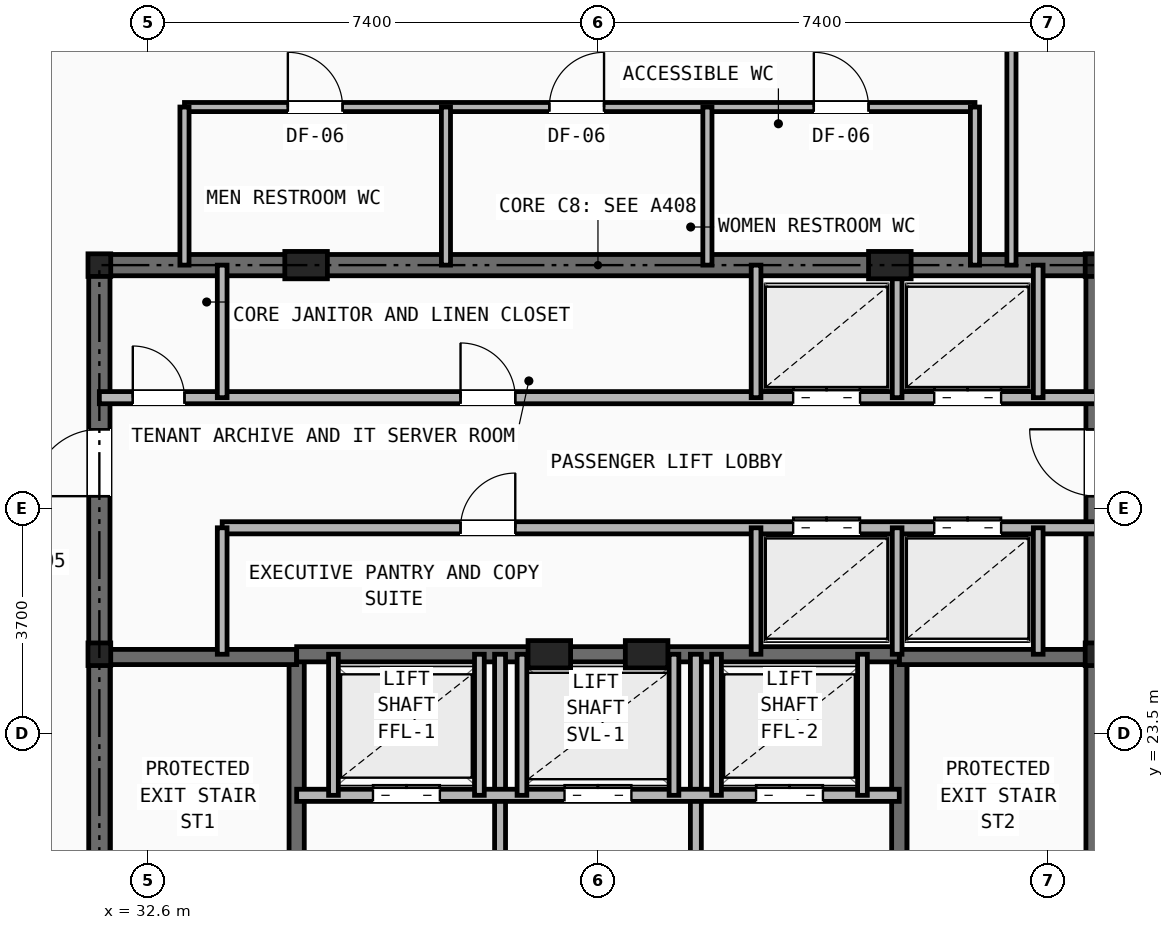
"""IFC4 building model, lengths in metres.
Left out: names, types, materials, properties, quantities, classifications, styles, units other than length and angle.
Written with IfcOpenShell. Run it as: python <this file> out.ifc"""

import sys

from ifc_helpers import new_model, si_unit, direction, frame, frame_2d, origin, origin_2d, place, context, subcontext, project, spatial, rectangle, i_section, extrude, element, fill, save


model = new_model("IFC4")
c1 = context("Model", 3, precision=1e-05, world=origin(), true_north=direction((0.0, 1.0)))
c2 = subcontext(c1, "Body", "Model", "MODEL_VIEW")
j1 = project(units=[si_unit("LENGTHUNIT", "METRE"), si_unit("PLANEANGLEUNIT", "RADIAN")], contexts=[c1])
p1 = place(None, origin())
s1 = spatial("IfcSite", under=j1, at=p1, CompositionType="ELEMENT")
p2 = place(p1, origin())
s2 = spatial("IfcBuilding", under=s1, at=p2, CompositionType="ELEMENT")
p3 = place(p2, frame((0.0, 0.0, 276.0)))
s3 = spatial("IfcBuildingStorey", under=s2, at=p3, CompositionType="ELEMENT", Elevation=276.0)
for number, where, z_axis, x_axis in (
    (1, (31.8, 24.8, 0.0), (0.0, 0.0, 1.0), (1.0, 0.0, 0.0)),
    (2, (48.2, 24.8, 0.0), (0.0, 0.0, 1.0), (1.0, 0.0, 0.0)),
    (3, (31.8, 31.2, 0.0), (0.0, 0.0, 1.0), (1.0, 0.0, 0.0)),
    (4, (48.2, 31.2, 0.0), (0.0, 0.0, 1.0), (1.0, 0.0, 0.0)),
):
    element("IfcColumn", number, at=place(p3, frame(where, z_axis=z_axis, x_axis=x_axis)), inside=s3, PredefinedType="COLUMN", context=c2, shape_type="SweptSolid", body=[
        extrude(i_section(OverallWidth=0.374, OverallDepth=0.372, WebThickness=0.016, FlangeThickness=0.026, at=origin_2d()), origin(), (0.0, 0.0, 1.0), 3.5),
    ])
for number, where, z_axis, x_axis in (
    (5, (35.2, 31.2, 0.0), (0.0, 0.0, 1.0), (1.0, 0.0, 0.0)),
    (6, (44.8, 31.2, 0.0), (0.0, 0.0, 1.0), (1.0, 0.0, 0.0)),
    (7, (39.2, 24.8, 0.0), (0.0, 0.0, 1.0), (1.0, 0.0, 0.0)),
    (8, (40.8, 24.8, 0.0), (0.0, 0.0, 1.0), (1.0, 0.0, 0.0)),
):
    element("IfcColumn", number, at=place(p3, frame(where, z_axis=z_axis, x_axis=x_axis)), inside=s3, PredefinedType="PILASTER", context=c2, shape_type="SweptSolid", body=[
        extrude(rectangle(XDim=0.7, YDim=0.45, at=origin_2d()), origin(), (0.0, 0.0, 1.0), 3.5),
    ])
p4 = place(p3, frame((31.8, 31.2, 0.0), z_axis=(0.0, 0.0, 1.0), x_axis=(1.0, 0.0, 0.0)))
e9 = element("IfcWall", 9, at=p4, inside=s3, PredefinedType="SHEAR", context=c2, shape_type="SweptSolid", body=[
    extrude(rectangle(XDim=16.4, YDim=0.35, at=frame_2d((8.2, 0.0))), origin(), (0.0, 0.0, 1.0), 3.25),
])
p5 = place(p3, frame((31.8, 16.4, 0.0), z_axis=(0.0, 0.0, 1.0), x_axis=(0.0, 1.0, 0.0)))
e10 = element("IfcWall", 10, at=p5, inside=s3, PredefinedType="SHEAR", context=c2, shape_type="SweptSolid", body=[
    extrude(rectangle(XDim=14.8, YDim=0.35, at=frame_2d((7.4, 0.0))), origin(), (0.0, 0.0, 1.0), 3.25),
])
p6 = place(p5, frame((11.0, 0.0, 0.0)))
e11 = element("IfcOpeningElement", 11, at=p6, cuts=e10, PredefinedType="OPENING", context=c2, shape_type="SweptSolid", body=[
    extrude(rectangle(XDim=1.1, YDim=2.15, at=frame_2d((0.55, 1.075))), frame((0.0, 0.185, 0.0), z_axis=(0.0, -1.0, 0.0), x_axis=(1.0, 0.0, 0.0)), (0.0, 0.0, 1.0), 0.37),
])
p7 = place(p3, frame((48.2, 16.4, 0.0), z_axis=(0.0, 0.0, 1.0), x_axis=(0.0, 1.0, 0.0)))
e12 = element("IfcWall", 12, at=p7, inside=s3, PredefinedType="SHEAR", context=c2, shape_type="SweptSolid", body=[
    extrude(rectangle(XDim=14.8, YDim=0.35, at=frame_2d((7.4, 0.0))), origin(), (0.0, 0.0, 1.0), 3.25),
])
p8 = place(p7, frame((11.0, 0.0, 0.0)))
e13 = element("IfcOpeningElement", 13, at=p8, cuts=e12, PredefinedType="OPENING", context=c2, shape_type="SweptSolid", body=[
    extrude(rectangle(XDim=1.1, YDim=2.15, at=frame_2d((0.55, 1.075))), frame((0.0, 0.185, 0.0), z_axis=(0.0, -1.0, 0.0), x_axis=(1.0, 0.0, 0.0)), (0.0, 0.0, 1.0), 0.37),
])
p9 = place(p3, frame((35.045, 16.4, 0.0), z_axis=(0.0, 0.0, 1.0), x_axis=(0.0, 1.0, 0.0)))
e14 = element("IfcWall", 14, at=p9, inside=s3, PredefinedType="SHEAR", context=c2, shape_type="SweptSolid", body=[
    extrude(rectangle(XDim=8.4, YDim=0.25, at=frame_2d((4.2, 0.0))), origin(), (0.0, 0.0, 1.0), 3.25),
])
p10 = place(p9, frame((0.45, 0.0, 0.0)))
e15 = element("IfcOpeningElement", 15, at=p10, cuts=e14, PredefinedType="OPENING", context=c2, shape_type="SweptSolid", body=[
    extrude(rectangle(XDim=0.95, YDim=2.1, at=frame_2d((0.475, 1.05))), frame((0.0, 0.135, 0.0), z_axis=(0.0, -1.0, 0.0), x_axis=(1.0, 0.0, 0.0)), (0.0, 0.0, 1.0), 0.27),
])
p11 = place(p3, frame((31.8, 24.755, 0.0), z_axis=(0.0, 0.0, 1.0), x_axis=(1.0, 0.0, 0.0)))
e16 = element("IfcWall", 16, at=p11, inside=s3, PredefinedType="SHEAR", context=c2, shape_type="SweptSolid", body=[
    extrude(rectangle(XDim=3.245, YDim=0.25, at=frame_2d((1.623, 0.0))), origin(), (0.0, 0.0, 1.0), 3.25),
])
p12 = place(p3, frame((44.955, 16.4, 0.0), z_axis=(0.0, 0.0, 1.0), x_axis=(0.0, 1.0, 0.0)))
e17 = element("IfcWall", 17, at=p12, inside=s3, PredefinedType="SHEAR", context=c2, shape_type="SweptSolid", body=[
    extrude(rectangle(XDim=8.4, YDim=0.25, at=frame_2d((4.2, 0.0))), origin(), (0.0, 0.0, 1.0), 3.25),
])
p13 = place(p12, frame((0.45, 0.0, 0.0)))
e18 = element("IfcOpeningElement", 18, at=p13, cuts=e17, PredefinedType="OPENING", context=c2, shape_type="SweptSolid", body=[
    extrude(rectangle(XDim=0.95, YDim=2.1, at=frame_2d((0.475, 1.05))), frame((0.0, 0.135, 0.0), z_axis=(0.0, -1.0, 0.0), x_axis=(1.0, 0.0, 0.0)), (0.0, 0.0, 1.0), 0.27),
])
p14 = place(p3, frame((44.955, 24.755, 0.0), z_axis=(0.0, 0.0, 1.0), x_axis=(1.0, 0.0, 0.0)))
e19 = element("IfcWall", 19, at=p14, inside=s3, PredefinedType="SHEAR", context=c2, shape_type="SweptSolid", body=[
    extrude(rectangle(XDim=3.245, YDim=0.25, at=frame_2d((1.623, 0.0))), origin(), (0.0, 0.0, 1.0), 3.25),
])
p15 = place(p3, frame((35.045, 24.8, 0.0), z_axis=(0.0, 0.0, 1.0), x_axis=(1.0, 0.0, 0.0)))
e20 = element("IfcWall", 20, at=p15, inside=s3, PredefinedType="SHEAR", context=c2, shape_type="SweptSolid", body=[
    extrude(rectangle(XDim=9.91, YDim=0.25, at=frame_2d((4.955, 0.0))), origin(), (0.0, 0.0, 1.0), 3.25),
])
p16 = place(p3, frame((38.39, 16.4, 0.0), z_axis=(0.0, 0.0, 1.0), x_axis=(0.0, 1.0, 0.0)))
e21 = element("IfcWall", 21, at=p16, inside=s3, PredefinedType="PARTITIONING", context=c2, shape_type="SweptSolid", body=[
    extrude(rectangle(XDim=8.4, YDim=0.18, at=frame_2d((4.2, 0.0))), origin(), (0.0, 0.0, 1.0), 2.705),
])
p17 = place(p16, frame((3.8, 0.0, 0.0)))
e22 = element("IfcOpeningElement", 22, at=p17, cuts=e21, PredefinedType="OPENING", context=c2, shape_type="SweptSolid", body=[
    extrude(rectangle(XDim=0.95, YDim=2.1, at=frame_2d((0.475, 1.05))), frame((0.0, 0.1, 0.0), z_axis=(0.0, -1.0, 0.0), x_axis=(1.0, 0.0, 0.0)), (0.0, 0.0, 1.0), 0.2),
])
p18 = place(p3, frame((41.61, 16.4, 0.0), z_axis=(0.0, 0.0, 1.0), x_axis=(0.0, 1.0, 0.0)))
e23 = element("IfcWall", 23, at=p18, inside=s3, PredefinedType="PARTITIONING", context=c2, shape_type="SweptSolid", body=[
    extrude(rectangle(XDim=8.4, YDim=0.18, at=frame_2d((4.2, 0.0))), origin(), (0.0, 0.0, 1.0), 2.705),
])
p19 = place(p3, frame((35.045, 22.48, 0.0), z_axis=(0.0, 0.0, 1.0), x_axis=(1.0, 0.0, 0.0)))
e24 = element("IfcWall", 24, at=p19, inside=s3, PredefinedType="SOLIDWALL", context=c2, shape_type="SweptSolid", body=[
    extrude(rectangle(XDim=9.91, YDim=0.2, at=frame_2d((4.955, 0.0))), origin(), (0.0, 0.0, 1.0), 3.25),
])
p20 = place(p19, frame((1.255, 0.0, 0.0)))
e25 = element("IfcOpeningElement", 25, at=p20, cuts=e24, PredefinedType="OPENING", context=c2, shape_type="SweptSolid", body=[
    extrude(rectangle(XDim=1.1, YDim=2.15, at=frame_2d((0.55, 1.075))), frame((0.0, 0.11, 0.0), z_axis=(0.0, -1.0, 0.0), x_axis=(1.0, 0.0, 0.0)), (0.0, 0.0, 1.0), 0.22),
])
p21 = place(p19, frame((7.555, 0.0, 0.0)))
e26 = element("IfcOpeningElement", 26, at=p21, cuts=e24, PredefinedType="OPENING", context=c2, shape_type="SweptSolid", body=[
    extrude(rectangle(XDim=1.1, YDim=2.15, at=frame_2d((0.55, 1.075))), frame((0.0, 0.11, 0.0), z_axis=(0.0, -1.0, 0.0), x_axis=(1.0, 0.0, 0.0)), (0.0, 0.0, 1.0), 0.22),
])
p22 = place(p19, frame((4.405, 0.0, 0.0)))
e27 = element("IfcOpeningElement", 27, at=p22, cuts=e24, PredefinedType="OPENING", context=c2, shape_type="SweptSolid", body=[
    extrude(rectangle(XDim=1.1, YDim=2.15, at=frame_2d((0.55, 1.075))), frame((0.0, 0.11, 0.0), z_axis=(0.0, -1.0, 0.0), x_axis=(1.0, 0.0, 0.0)), (0.0, 0.0, 1.0), 0.22),
])
for number, where, z_axis, x_axis in (
    (28, (35.65, 22.48, 0.0), (0.0, 0.0, 1.0), (0.0, 1.0, 0.0)),
    (29, (38.05, 22.48, 0.0), (0.0, 0.0, 1.0), (0.0, 1.0, 0.0)),
    (30, (41.95, 22.48, 0.0), (0.0, 0.0, 1.0), (0.0, 1.0, 0.0)),
    (31, (44.35, 22.48, 0.0), (0.0, 0.0, 1.0), (0.0, 1.0, 0.0)),
    (32, (38.75, 22.48, 0.0), (0.0, 0.0, 1.0), (0.0, 1.0, 0.0)),
    (33, (41.25, 22.48, 0.0), (0.0, 0.0, 1.0), (0.0, 1.0, 0.0)),
):
    element("IfcWall", number, at=place(p3, frame(where, z_axis=z_axis, x_axis=x_axis)), inside=s3, PredefinedType="SOLIDWALL", context=c2, shape_type="SweptSolid", body=[
        extrude(rectangle(XDim=2.32, YDim=0.16, at=frame_2d((1.16, 0.0))), origin(), (0.0, 0.0, 1.0), 3.25),
    ])
p23 = place(p3, frame((31.8, 29.02, 0.0), z_axis=(0.0, 0.0, 1.0), x_axis=(1.0, 0.0, 0.0)))
e34 = element("IfcWall", 34, at=p23, inside=s3, PredefinedType="SOLIDWALL", context=c2, shape_type="SweptSolid", body=[
    extrude(rectangle(XDim=16.4, YDim=0.2, at=frame_2d((8.2, 0.0))), origin(), (0.0, 0.0, 1.0), 2.705),
])
p24 = place(p23, frame((0.55, 0.0, 0.0)))
e35 = element("IfcOpeningElement", 35, at=p24, cuts=e34, PredefinedType="OPENING", context=c2, shape_type="SweptSolid", body=[
    extrude(rectangle(XDim=0.85, YDim=2.05, at=frame_2d((0.425, 1.025))), frame((0.0, 0.11, 0.0), z_axis=(0.0, -1.0, 0.0), x_axis=(1.0, 0.0, 0.0)), (0.0, 0.0, 1.0), 0.22),
])
p25 = place(p23, frame((5.94, 0.0, 0.0)))
e36 = element("IfcOpeningElement", 36, at=p25, cuts=e34, PredefinedType="OPENING", context=c2, shape_type="SweptSolid", body=[
    extrude(rectangle(XDim=0.9, YDim=2.1, at=frame_2d((0.45, 1.05))), frame((0.0, 0.11, 0.0), z_axis=(0.0, -1.0, 0.0), x_axis=(1.0, 0.0, 0.0)), (0.0, 0.0, 1.0), 0.22),
])
p26 = place(p23, frame((11.41, 0.0, 0.0)))
e37 = element("IfcOpeningElement", 37, at=p26, cuts=e34, PredefinedType="OPENING", context=c2, shape_type="SweptSolid", body=[
    extrude(rectangle(XDim=1.1, YDim=2.15, at=frame_2d((0.55, 1.075))), frame((0.0, 0.11, 0.0), z_axis=(0.0, -1.0, 0.0), x_axis=(1.0, 0.0, 0.0)), (0.0, 0.0, 1.0), 0.22),
])
p27 = place(p23, frame((13.73, 0.0, 0.0)))
e38 = element("IfcOpeningElement", 38, at=p27, cuts=e34, PredefinedType="OPENING", context=c2, shape_type="SweptSolid", body=[
    extrude(rectangle(XDim=1.1, YDim=2.15, at=frame_2d((0.55, 1.075))), frame((0.0, 0.11, 0.0), z_axis=(0.0, -1.0, 0.0), x_axis=(1.0, 0.0, 0.0)), (0.0, 0.0, 1.0), 0.22),
])
p28 = place(p3, frame((33.82, 26.88, 0.0), z_axis=(0.0, 0.0, 1.0), x_axis=(1.0, 0.0, 0.0)))
e39 = element("IfcWall", 39, at=p28, inside=s3, PredefinedType="SOLIDWALL", context=c2, shape_type="SweptSolid", body=[
    extrude(rectangle(XDim=14.38, YDim=0.2, at=frame_2d((7.19, 0.0))), origin(), (0.0, 0.0, 1.0), 2.705),
])
p29 = place(p28, frame((3.92, 0.0, 0.0)))
e40 = element("IfcOpeningElement", 40, at=p29, cuts=e39, PredefinedType="OPENING", context=c2, shape_type="SweptSolid", body=[
    extrude(rectangle(XDim=0.9, YDim=2.1, at=frame_2d((0.45, 1.05))), frame((0.0, 0.11, 0.0), z_axis=(0.0, -1.0, 0.0), x_axis=(1.0, 0.0, 0.0)), (0.0, 0.0, 1.0), 0.22),
])
p30 = place(p28, frame((9.39, 0.0, 0.0)))
e41 = element("IfcOpeningElement", 41, at=p30, cuts=e39, PredefinedType="OPENING", context=c2, shape_type="SweptSolid", body=[
    extrude(rectangle(XDim=1.1, YDim=2.15, at=frame_2d((0.55, 1.075))), frame((0.0, 0.11, 0.0), z_axis=(0.0, -1.0, 0.0), x_axis=(1.0, 0.0, 0.0)), (0.0, 0.0, 1.0), 0.22),
])
p31 = place(p28, frame((11.71, 0.0, 0.0)))
e42 = element("IfcOpeningElement", 42, at=p31, cuts=e39, PredefinedType="OPENING", context=c2, shape_type="SweptSolid", body=[
    extrude(rectangle(XDim=1.1, YDim=2.15, at=frame_2d((0.55, 1.075))), frame((0.0, 0.11, 0.0), z_axis=(0.0, -1.0, 0.0), x_axis=(1.0, 0.0, 0.0)), (0.0, 0.0, 1.0), 0.22),
])
p32 = place(p3, frame((33.82, 29.02, 0.0), z_axis=(0.0, 0.0, 1.0), x_axis=(0.0, 1.0, 0.0)))
e43 = element("IfcWall", 43, at=p32, inside=s3, PredefinedType="SOLIDWALL", context=c2, shape_type="SweptSolid", body=[
    extrude(rectangle(XDim=2.18, YDim=0.16, at=frame_2d((1.09, 0.0))), origin(), (0.0, 0.0, 1.0), 2.705),
])
p33 = place(p3, frame((33.82, 24.8, 0.0), z_axis=(0.0, 0.0, 1.0), x_axis=(0.0, 1.0, 0.0)))
e44 = element("IfcWall", 44, at=p33, inside=s3, PredefinedType="SOLIDWALL", context=c2, shape_type="SweptSolid", body=[
    extrude(rectangle(XDim=2.08, YDim=0.16, at=frame_2d((1.04, 0.0))), origin(), (0.0, 0.0, 1.0), 3.25),
])
for number, where, z_axis, x_axis in (
    (45, (42.6, 29.02, 0.0), (0.0, 0.0, 1.0), (0.0, 1.0, 0.0)),
    (46, (44.92, 29.02, 0.0), (0.0, 0.0, 1.0), (0.0, 1.0, 0.0)),
    (47, (47.24, 29.02, 0.0), (0.0, 0.0, 1.0), (0.0, 1.0, 0.0)),
):
    element("IfcWall", number, at=place(p3, frame(where, z_axis=z_axis, x_axis=x_axis)), inside=s3, PredefinedType="SOLIDWALL", context=c2, shape_type="SweptSolid", body=[
        extrude(rectangle(XDim=2.18, YDim=0.16, at=frame_2d((1.09, 0.0))), origin(), (0.0, 0.0, 1.0), 2.705),
    ])
for number, where, z_axis, x_axis in (
    (48, (42.6, 24.8, 0.0), (0.0, 0.0, 1.0), (0.0, 1.0, 0.0)),
    (49, (44.92, 24.8, 0.0), (0.0, 0.0, 1.0), (0.0, 1.0, 0.0)),
    (50, (47.24, 24.8, 0.0), (0.0, 0.0, 1.0), (0.0, 1.0, 0.0)),
):
    element("IfcWall", number, at=place(p3, frame(where, z_axis=z_axis, x_axis=x_axis)), inside=s3, PredefinedType="SOLIDWALL", context=c2, shape_type="SweptSolid", body=[
        extrude(rectangle(XDim=2.08, YDim=0.16, at=frame_2d((1.04, 0.0))), origin(), (0.0, 0.0, 1.0), 3.25),
    ])
p34 = place(p3, frame((33.2, 33.8, 0.0), z_axis=(0.0, 0.0, 1.0), x_axis=(1.0, 0.0, 0.0)))
e51 = element("IfcWall", 51, at=p34, inside=s3, PredefinedType="PARTITIONING", context=c2, shape_type="SweptSolid", body=[
    extrude(rectangle(XDim=13.0, YDim=0.15, at=frame_2d((6.5, 0.0))), origin(), (0.0, 0.0, 1.0), 3.25),
])
p35 = place(p34, frame((1.7, 0.0, 0.0)))
e52 = element("IfcOpeningElement", 52, at=p35, cuts=e51, PredefinedType="OPENING", context=c2, shape_type="SweptSolid", body=[
    extrude(rectangle(XDim=0.9, YDim=2.1, at=frame_2d((0.45, 1.05))), frame((0.0, 0.085, 0.0), z_axis=(0.0, -1.0, 0.0), x_axis=(1.0, 0.0, 0.0)), (0.0, 0.0, 1.0), 0.17),
])
p36 = place(p34, frame((6.0, 0.0, 0.0)))
e53 = element("IfcOpeningElement", 53, at=p36, cuts=e51, PredefinedType="OPENING", context=c2, shape_type="SweptSolid", body=[
    extrude(rectangle(XDim=0.9, YDim=2.1, at=frame_2d((0.45, 1.05))), frame((0.0, 0.085, 0.0), z_axis=(0.0, -1.0, 0.0), x_axis=(1.0, 0.0, 0.0)), (0.0, 0.0, 1.0), 0.17),
])
p37 = place(p34, frame((10.35, 0.0, 0.0)))
e54 = element("IfcOpeningElement", 54, at=p37, cuts=e51, PredefinedType="OPENING", context=c2, shape_type="SweptSolid", body=[
    extrude(rectangle(XDim=0.9, YDim=2.1, at=frame_2d((0.45, 1.05))), frame((0.0, 0.085, 0.0), z_axis=(0.0, -1.0, 0.0), x_axis=(1.0, 0.0, 0.0)), (0.0, 0.0, 1.0), 0.17),
])
for number, where, z_axis, x_axis in (
    (55, (33.2, 31.2, 0.0), (0.0, 0.0, 1.0), (0.0, 1.0, 0.0)),
    (56, (46.2, 31.2, 0.0), (0.0, 0.0, 1.0), (0.0, 1.0, 0.0)),
    (57, (37.5, 31.2, 0.0), (0.0, 0.0, 1.0), (0.0, 1.0, 0.0)),
    (58, (41.8, 31.2, 0.0), (0.0, 0.0, 1.0), (0.0, 1.0, 0.0)),
):
    element("IfcWall", number, at=place(p3, frame(where, z_axis=z_axis, x_axis=x_axis)), inside=s3, PredefinedType="PARTITIONING", context=c2, shape_type="SweptSolid", body=[
        extrude(rectangle(XDim=2.6, YDim=0.15, at=frame_2d((1.3, 0.0))), origin(), (0.0, 0.0, 1.0), 2.705),
    ])
p38 = place(p3, frame((46.8, 31.2, 0.0), z_axis=(0.0, 0.0, 1.0), x_axis=(0.0, 1.0, 0.0)))
e59 = element("IfcWall", 59, at=p38, inside=s3, PredefinedType="PARTITIONING", context=c2, shape_type="SweptSolid", body=[
    extrude(rectangle(XDim=4.5, YDim=0.15, at=frame_2d((2.25, 0.0))), origin(), (0.0, 0.0, 1.0), 2.705),
])
p39 = place(p20, origin())
e60 = element("IfcDoor", 60, at=p39, inside=s3, OperationType="DOUBLE_DOOR_SLIDING", PredefinedType="DOOR", context=c2, shape_type="SweptSolid", body=[
    extrude(rectangle(XDim=1.1, YDim=2.15, at=frame_2d((0.55, 1.075))), frame((0.0, 0.025, 0.0), z_axis=(0.0, -1.0, 0.0), x_axis=(1.0, 0.0, 0.0)), (0.0, 0.0, 1.0), 0.05),
])
fill(e25, e60)
p40 = place(p21, origin())
e61 = element("IfcDoor", 61, at=p40, inside=s3, OperationType="DOUBLE_DOOR_SLIDING", PredefinedType="DOOR", context=c2, shape_type="SweptSolid", body=[
    extrude(rectangle(XDim=1.1, YDim=2.15, at=frame_2d((0.55, 1.075))), frame((0.0, 0.025, 0.0), z_axis=(0.0, -1.0, 0.0), x_axis=(1.0, 0.0, 0.0)), (0.0, 0.0, 1.0), 0.05),
])
fill(e26, e61)
p41 = place(p22, origin())
e62 = element("IfcDoor", 62, at=p41, inside=s3, OperationType="DOUBLE_DOOR_SLIDING", PredefinedType="DOOR", context=c2, shape_type="SweptSolid", body=[
    extrude(rectangle(XDim=1.1, YDim=2.15, at=frame_2d((0.55, 1.075))), frame((0.0, 0.025, 0.0), z_axis=(0.0, -1.0, 0.0), x_axis=(1.0, 0.0, 0.0)), (0.0, 0.0, 1.0), 0.05),
])
fill(e27, e62)
p42 = place(p24, origin())
e63 = element("IfcDoor", 63, at=p42, inside=s3, OperationType="SINGLE_SWING_LEFT", PredefinedType="DOOR", context=c2, shape_type="SweptSolid", body=[
    extrude(rectangle(XDim=0.85, YDim=2.05, at=frame_2d((0.425, 1.025))), frame((0.0, 0.025, 0.0), z_axis=(0.0, -1.0, 0.0), x_axis=(1.0, 0.0, 0.0)), (0.0, 0.0, 1.0), 0.05),
])
fill(e35, e63)
p43 = place(p6, origin())
e64 = element("IfcDoor", 64, at=p43, inside=s3, OperationType="SINGLE_SWING_LEFT", PredefinedType="DOOR", context=c2, shape_type="SweptSolid", body=[
    extrude(rectangle(XDim=1.1, YDim=2.15, at=frame_2d((0.55, 1.075))), frame((0.0, 0.025, 0.0), z_axis=(0.0, -1.0, 0.0), x_axis=(1.0, 0.0, 0.0)), (0.0, 0.0, 1.0), 0.05),
])
fill(e11, e64)
p44 = place(p25, origin())
e65 = element("IfcDoor", 65, at=p44, inside=s3, OperationType="SINGLE_SWING_LEFT", PredefinedType="DOOR", context=c2, shape_type="SweptSolid", body=[
    extrude(rectangle(XDim=0.9, YDim=2.1, at=frame_2d((0.45, 1.05))), frame((0.0, 0.025, 0.0), z_axis=(0.0, -1.0, 0.0), x_axis=(1.0, 0.0, 0.0)), (0.0, 0.0, 1.0), 0.05),
])
fill(e36, e65)
p45 = place(p29, origin())
e66 = element("IfcDoor", 66, at=p45, inside=s3, OperationType="SINGLE_SWING_RIGHT", PredefinedType="DOOR", context=c2, shape_type="SweptSolid", body=[
    extrude(rectangle(XDim=0.9, YDim=2.1, at=frame_2d((0.45, 1.05))), frame((0.0, 0.025, 0.0), z_axis=(0.0, -1.0, 0.0), x_axis=(1.0, 0.0, 0.0)), (0.0, 0.0, 1.0), 0.05),
])
fill(e40, e66)
p46 = place(p26, origin())
e67 = element("IfcDoor", 67, at=p46, inside=s3, OperationType="DOUBLE_DOOR_SLIDING", PredefinedType="DOOR", context=c2, shape_type="SweptSolid", body=[
    extrude(rectangle(XDim=1.1, YDim=2.15, at=frame_2d((0.55, 1.075))), frame((0.0, 0.025, 0.0), z_axis=(0.0, -1.0, 0.0), x_axis=(1.0, 0.0, 0.0)), (0.0, 0.0, 1.0), 0.05),
])
fill(e37, e67)
p47 = place(p27, origin())
e68 = element("IfcDoor", 68, at=p47, inside=s3, OperationType="DOUBLE_DOOR_SLIDING", PredefinedType="DOOR", context=c2, shape_type="SweptSolid", body=[
    extrude(rectangle(XDim=1.1, YDim=2.15, at=frame_2d((0.55, 1.075))), frame((0.0, 0.025, 0.0), z_axis=(0.0, -1.0, 0.0), x_axis=(1.0, 0.0, 0.0)), (0.0, 0.0, 1.0), 0.05),
])
fill(e38, e68)
p48 = place(p30, origin())
e69 = element("IfcDoor", 69, at=p48, inside=s3, OperationType="DOUBLE_DOOR_SLIDING", PredefinedType="DOOR", context=c2, shape_type="SweptSolid", body=[
    extrude(rectangle(XDim=1.1, YDim=2.15, at=frame_2d((0.55, 1.075))), frame((0.0, 0.025, 0.0), z_axis=(0.0, -1.0, 0.0), x_axis=(1.0, 0.0, 0.0)), (0.0, 0.0, 1.0), 0.05),
])
fill(e41, e69)
p49 = place(p31, origin())
e70 = element("IfcDoor", 70, at=p49, inside=s3, OperationType="DOUBLE_DOOR_SLIDING", PredefinedType="DOOR", context=c2, shape_type="SweptSolid", body=[
    extrude(rectangle(XDim=1.1, YDim=2.15, at=frame_2d((0.55, 1.075))), frame((0.0, 0.025, 0.0), z_axis=(0.0, -1.0, 0.0), x_axis=(1.0, 0.0, 0.0)), (0.0, 0.0, 1.0), 0.05),
])
fill(e42, e70)
p50 = place(p35, origin())
e71 = element("IfcDoor", 71, at=p50, inside=s3, OperationType="SINGLE_SWING_LEFT", PredefinedType="DOOR", context=c2, shape_type="SweptSolid", body=[
    extrude(rectangle(XDim=0.9, YDim=2.1, at=frame_2d((0.45, 1.05))), frame((0.0, 0.025, 0.0), z_axis=(0.0, -1.0, 0.0), x_axis=(1.0, 0.0, 0.0)), (0.0, 0.0, 1.0), 0.05),
])
fill(e52, e71)
p51 = place(p36, origin())
e72 = element("IfcDoor", 72, at=p51, inside=s3, OperationType="SINGLE_SWING_RIGHT", PredefinedType="DOOR", context=c2, shape_type="SweptSolid", body=[
    extrude(rectangle(XDim=0.9, YDim=2.1, at=frame_2d((0.45, 1.05))), frame((0.0, 0.025, 0.0), z_axis=(0.0, -1.0, 0.0), x_axis=(1.0, 0.0, 0.0)), (0.0, 0.0, 1.0), 0.05),
])
fill(e53, e72)
p52 = place(p37, origin())
e73 = element("IfcDoor", 73, at=p52, inside=s3, OperationType="SINGLE_SWING_LEFT", PredefinedType="DOOR", context=c2, shape_type="SweptSolid", body=[
    extrude(rectangle(XDim=0.9, YDim=2.1, at=frame_2d((0.45, 1.05))), frame((0.0, 0.025, 0.0), z_axis=(0.0, -1.0, 0.0), x_axis=(1.0, 0.0, 0.0)), (0.0, 0.0, 1.0), 0.05),
])
fill(e54, e73)
save(model, sys.argv[1])
